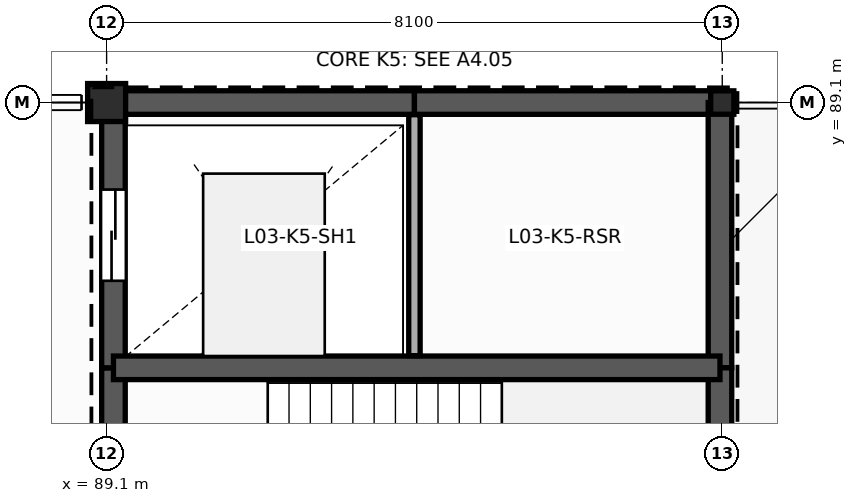
"""IFC4 building model, lengths in metres.
Left out: names, types, materials, properties, quantities, classifications, styles, units other than length and angle.
Written with IfcOpenShell. Run it as: python <this file> out.ifc"""

import sys

from ifc_helpers import new_model, si_unit, direction, frame, frame_2d, origin, origin_2d, place, context, subcontext, project, spatial, rectangle, i_section, extrude, element, fill, save


model = new_model("IFC4")
c1 = context("Model", 3, precision=1e-05, world=origin(), true_north=direction((0.0, 1.0)))
c2 = subcontext(c1, "Body", "Model", "MODEL_VIEW")
j1 = project(units=[si_unit("LENGTHUNIT", "METRE"), si_unit("PLANEANGLEUNIT", "RADIAN")], contexts=[c1])
p1 = place(None, origin())
s1 = spatial("IfcSite", under=j1, at=p1, CompositionType="ELEMENT")
p2 = place(p1, origin())
s2 = spatial("IfcBuilding", under=s1, at=p2, CompositionType="ELEMENT")
p3 = place(p2, frame((0.0, 0.0, 15.0)))
s3 = spatial("IfcBuildingStorey", under=s2, at=p3, CompositionType="ELEMENT", Elevation=15.0)
p4 = place(p3, frame((89.1, 89.1, 0.0), z_axis=(0.0, 0.0, 1.0), x_axis=(1.0, 0.0, 0.0)))
e1 = element("IfcColumn", 1, at=p4, inside=s3, PredefinedType="COLUMN", context=c2, shape_type="SweptSolid", body=[
    extrude(rectangle(XDim=0.5, YDim=0.5, at=origin_2d()), origin(), (0.0, 0.0, 1.0), 4.2),
])
p5 = place(p3, frame((97.2, 89.1, 0.0), z_axis=(0.0, 0.0, 1.0), x_axis=(1.0, 0.0, 0.0)))
e2 = element("IfcColumn", 2, at=p5, inside=s3, PredefinedType="COLUMN", context=c2, shape_type="SweptSolid", body=[
    extrude(i_section(OverallWidth=0.305, OverallDepth=0.308, WebThickness=0.01, FlangeThickness=0.015, FilletRadius=0.015, at=origin_2d()), origin(), (0.0, 0.0, 1.0), 4.2),
])
p6 = place(p3, frame((89.19, 81.25, 0.0), z_axis=(0.0, 0.0, 1.0), x_axis=(0.0, 1.0, 0.0)))
e3 = element("IfcWall", 3, at=p6, inside=s3, PredefinedType="SHEAR", context=c2, shape_type="SweptSolid", body=[
    extrude(rectangle(XDim=4.36, YDim=0.31, at=frame_2d((2.18, 0.0))), origin(), (0.0, 0.0, 1.0), 4.2),
])
p7 = place(p6, frame((1.35, 0.0, 0.0)))
e4 = element("IfcOpeningElement", 4, at=p7, cuts=e3, PredefinedType="OPENING", context=c2, shape_type="SweptSolid", body=[
    extrude(rectangle(XDim=1.2, YDim=2.25, at=frame_2d((0.6, 1.125))), frame((0.0, 0.165, 0.0), z_axis=(0.0, -1.0, 0.0), x_axis=(1.0, 0.0, 0.0)), (0.0, 0.0, 1.0), 0.33),
])
p8 = place(p3, frame((89.19, 85.61, 0.0), z_axis=(0.0, 0.0, 1.0), x_axis=(0.0, 1.0, 0.0)))
e5 = element("IfcWall", 5, at=p8, inside=s3, PredefinedType="SHEAR", context=c2, shape_type="SweptSolid", body=[
    extrude(rectangle(XDim=3.49, YDim=0.31, at=frame_2d((1.745, 0.0))), origin(), (0.0, 0.0, 1.0), 4.2),
])
p9 = place(p8, frame((1.145, 0.0, 0.0)))
e6 = element("IfcOpeningElement", 6, at=p9, cuts=e5, PredefinedType="OPENING", context=c2, shape_type="SweptSolid", body=[
    extrude(rectangle(XDim=1.2, YDim=2.2, at=frame_2d((0.6, 1.1))), frame((0.0, 0.165, 0.0), z_axis=(0.0, -1.0, 0.0), x_axis=(1.0, 0.0, 0.0)), (0.0, 0.0, 1.0), 0.33),
])
p10 = place(p3, frame((89.19, 89.1, 0.0), z_axis=(0.0, 0.0, 1.0), x_axis=(1.0, 0.0, 0.0)))
e7 = element("IfcWall", 7, at=p10, inside=s3, PredefinedType="SHEAR", context=c2, shape_type="SweptSolid", body=[
    extrude(rectangle(XDim=3.96, YDim=0.31, at=frame_2d((1.98, 0.0))), origin(), (0.0, 0.0, 1.0), 4.2),
])
p11 = place(p3, frame((93.15, 89.1, 0.0), z_axis=(0.0, 0.0, 1.0), x_axis=(1.0, 0.0, 0.0)))
e8 = element("IfcWall", 8, at=p11, inside=s3, PredefinedType="SHEAR", context=c2, shape_type="SweptSolid", body=[
    extrude(rectangle(XDim=4.02, YDim=0.31, at=frame_2d((2.01, 0.0))), origin(), (0.0, 0.0, 1.0), 4.2),
])
p12 = place(p3, frame((97.17, 89.1, 0.0), z_axis=(0.0, 0.0, 1.0), x_axis=(0.0, -1.0, 0.0)))
e9 = element("IfcWall", 9, at=p12, inside=s3, PredefinedType="SHEAR", context=c2, shape_type="SweptSolid", body=[
    extrude(rectangle(XDim=3.49, YDim=0.31, at=frame_2d((1.745, 0.0))), origin(), (0.0, 0.0, 1.0), 4.2),
])
p13 = place(p3, frame((97.17, 85.61, 0.0), z_axis=(0.0, 0.0, 1.0), x_axis=(0.0, -1.0, 0.0)))
e10 = element("IfcWall", 10, at=p13, inside=s3, PredefinedType="SHEAR", context=c2, shape_type="SweptSolid", body=[
    extrude(rectangle(XDim=4.36, YDim=0.31, at=frame_2d((2.18, 0.0))), origin(), (0.0, 0.0, 1.0), 4.2),
])
p14 = place(p3, frame((89.19, 85.61, 0.0), z_axis=(0.0, 0.0, 1.0), x_axis=(1.0, 0.0, 0.0)))
e11 = element("IfcWall", 11, at=p14, inside=s3, PredefinedType="SHEAR", context=c2, shape_type="SweptSolid", body=[
    extrude(rectangle(XDim=7.98, YDim=0.31, at=frame_2d((3.99, 0.0))), origin(), (0.0, 0.0, 1.0), 4.2),
])
p15 = place(p3, frame((93.15, 85.77, 0.0), z_axis=(0.0, 0.0, 1.0), x_axis=(0.0, 1.0, 0.0)))
e12 = element("IfcWall", 12, at=p15, inside=s3, PredefinedType="PLUMBINGWALL", context=c2, shape_type="SweptSolid", body=[
    extrude(rectangle(XDim=3.17, YDim=0.15, at=frame_2d((1.585, 0.0))), origin(), (0.0, 0.0, 1.0), 3.85),
])
p16 = place(p9, origin())
e13 = element("IfcDoor", 13, at=p16, inside=s3, OperationType="SLIDING_TO_LEFT", PredefinedType="DOOR", context=c2, shape_type="SweptSolid", body=[
    extrude(rectangle(XDim=1.2, YDim=2.2, at=frame_2d((0.6, 1.1))), frame((0.0, 0.025, 0.0), z_axis=(0.0, -1.0, 0.0), x_axis=(1.0, 0.0, 0.0)), (0.0, 0.0, 1.0), 0.05),
])
fill(e6, e13)
save(model, sys.argv[1])
